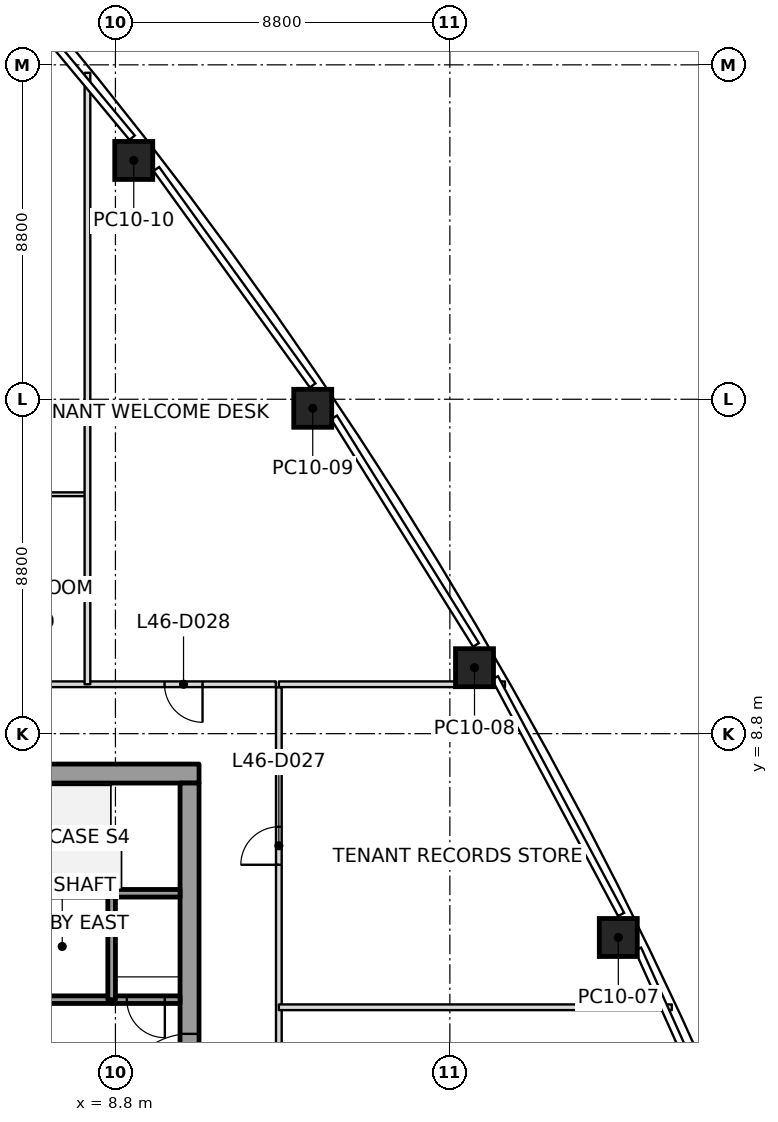
"""IFC4 building model, lengths in metres.
Left out: names, types, materials, properties, quantities, classifications, styles, units other than length and angle.
Written with IfcOpenShell. Run it as: python <this file> out.ifc"""

import sys

from ifc_helpers import new_model, si_unit, direction, frame, frame_2d, origin, origin_2d, place, context, subcontext, project, spatial, rectangle, extrude, element, fill, save


model = new_model("IFC4")
c1 = context("Model", 3, precision=1e-05, world=origin(), true_north=direction((0.0, 1.0)))
c2 = subcontext(c1, "Body", "Model", "MODEL_VIEW")
j1 = project(units=[si_unit("LENGTHUNIT", "METRE"), si_unit("PLANEANGLEUNIT", "RADIAN")], contexts=[c1])
p1 = place(None, origin())
s1 = spatial("IfcSite", under=j1, at=p1, CompositionType="ELEMENT")
p2 = place(p1, origin())
s2 = spatial("IfcBuilding", under=s1, at=p2, CompositionType="ELEMENT")
p3 = place(p2, frame((0.0, 0.0, 205.8)))
s3 = spatial("IfcBuildingStorey", under=s2, at=p3, CompositionType="ELEMENT", Elevation=205.8)
p4 = place(p3, frame((22.032, 3.436, 0.0), z_axis=(-0.014097691364, 0.002013955909, 0.999898594398), x_axis=(-0.440047461755, 0.897938764749, -0.008012874933)))
e1 = element("IfcColumn", 1, at=p4, inside=s3, PredefinedType="COLUMN", context=c2, shape_type="SweptSolid", body=[
    extrude(rectangle(XDim=1.0, YDim=1.0, at=origin_2d()), origin(), (0.0, 0.0, 1.0), 4.0),
])
p5 = place(p3, frame((18.248, 10.536, 0.0), z_axis=(-0.009887052741, -0.005675900648, 0.999935013058), x_axis=(-0.49997556095, 0.866039512773, -2.7732311e-05)))
e2 = element("IfcColumn", 2, at=p5, inside=s3, PredefinedType="COLUMN", context=c2, shape_type="SweptSolid", body=[
    extrude(rectangle(XDim=1.0, YDim=1.0, at=origin_2d()), origin(), (0.0, 0.0, 1.0), 4.0),
])
p6 = place(p3, frame((13.992, 17.362, 0.0), z_axis=(-0.005248490815, -0.013243284963, 0.999898529226), x_axis=(-0.557596902326, 0.830072656678, 0.008067165094)))
e3 = element("IfcColumn", 3, at=p6, inside=s3, PredefinedType="COLUMN", context=c2, shape_type="SweptSolid", body=[
    extrude(rectangle(XDim=1.0, YDim=1.0, at=origin_2d()), origin(), (0.0, 0.0, 1.0), 4.0),
])
p7 = place(p3, frame((9.282, 23.884, 0.0), z_axis=(-0.0002440896, -0.020442503975, 0.999791000385), x_axis=(-0.612639458627, 0.790200388685, 0.016007481224)))
e4 = element("IfcColumn", 4, at=p7, inside=s3, PredefinedType="COLUMN", context=c2, shape_type="SweptSolid", body=[
    extrude(rectangle(XDim=1.0, YDim=1.0, at=origin_2d()), origin(), (0.0, 0.0, 1.0), 4.001),
])
p8 = place(p3, frame((-11.0, 7.75, 0.0), z_axis=(0.0, 0.0, 1.0), x_axis=(1.0, 0.0, 0.0)))
e5 = element("IfcWall", 5, at=p8, inside=s3, PredefinedType="SHEAR", context=c2, shape_type="SweptSolid", body=[
    extrude(rectangle(XDim=22.0, YDim=0.5, at=frame_2d((11.0, 0.0))), origin(), (0.0, 0.0, 1.0), 4.0),
])
p9 = place(p8, frame((10.45, 0.0, 0.0)))
e6 = element("IfcOpeningElement", 6, at=p9, cuts=e5, PredefinedType="OPENING", context=c2, shape_type="SweptSolid", body=[
    extrude(rectangle(XDim=1.1, YDim=2.1, at=frame_2d((0.55, 1.05))), frame((0.0, 0.25, 0.0), z_axis=(0.0, -1.0, 0.0), x_axis=(1.0, 0.0, 0.0)), (0.0, 0.0, 1.0), 0.5),
])
p10 = place(p3, frame((10.75, -7.5, 0.0), z_axis=(0.0, 0.0, 1.0), x_axis=(0.0, 1.0, 0.0)))
e7 = element("IfcWall", 7, at=p10, inside=s3, PredefinedType="SHEAR", context=c2, shape_type="SweptSolid", body=[
    extrude(rectangle(XDim=15.0, YDim=0.5, at=frame_2d((7.5, 0.0))), origin(), (0.0, 0.0, 1.0), 4.0),
])
p11 = place(p10, frame((6.6, 0.0, 0.0)))
e8 = element("IfcOpeningElement", 8, at=p11, cuts=e7, PredefinedType="OPENING", context=c2, shape_type="SweptSolid", body=[
    extrude(rectangle(XDim=1.8, YDim=2.1, at=frame_2d((0.9, 1.05))), frame((0.0, 0.25, 0.0), z_axis=(0.0, -1.0, 0.0), x_axis=(1.0, 0.0, 0.0)), (0.0, 0.0, 1.0), 0.5),
])
for number, where, z_axis, x_axis in (
    (9, (8.7, 1.8, 0.0), (0.0, 0.0, 1.0), (-1.0, 0.0, 0.0)),
    (10, (8.7, 4.6, 0.0), (0.0, 0.0, 1.0), (-1.0, 0.0, 0.0)),
):
    element("IfcWall", number, at=place(p3, frame(where, z_axis=z_axis, x_axis=x_axis)), inside=s3, PredefinedType="SOLIDWALL", context=c2, shape_type="SweptSolid", body=[
        extrude(rectangle(XDim=2.6, YDim=0.2, at=frame_2d((1.3, 0.0))), origin(), (0.0, 0.0, 1.0), 3.85),
    ])
p12 = place(p3, frame((10.5, 1.8, 0.0), z_axis=(0.0, 0.0, 1.0), x_axis=(-1.0, 0.0, 0.0)))
e11 = element("IfcWall", 11, at=p12, inside=s3, PredefinedType="SOLIDWALL", context=c2, shape_type="SweptSolid", body=[
    extrude(rectangle(XDim=1.8, YDim=0.2, at=frame_2d((0.9, 0.0))), origin(), (0.0, 0.0, 1.0), 3.85),
])
p13 = place(p12, frame((0.4, 0.0, 0.0)))
e12 = element("IfcOpeningElement", 12, at=p13, cuts=e11, PredefinedType="OPENING", context=c2, shape_type="SweptSolid", body=[
    extrude(rectangle(XDim=1.0, YDim=2.1, at=frame_2d((0.5, 1.05))), frame((0.0, 0.1, 0.0), z_axis=(0.0, -1.0, 0.0), x_axis=(1.0, 0.0, 0.0)), (0.0, 0.0, 1.0), 0.2),
])
p14 = place(p3, frame((8.7, 4.6, 0.0), z_axis=(0.0, 0.0, 1.0), x_axis=(0.0, -1.0, 0.0)))
e13 = element("IfcWall", 13, at=p14, inside=s3, PredefinedType="SOLIDWALL", context=c2, shape_type="SweptSolid", body=[
    extrude(rectangle(XDim=2.8, YDim=0.2, at=frame_2d((1.4, 0.0))), origin(), (0.0, 0.0, 1.0), 3.85),
])
p15 = place(p3, frame((10.5, 4.6, 0.0), z_axis=(0.0, 0.0, 1.0), x_axis=(-1.0, 0.0, 0.0)))
e14 = element("IfcWall", 14, at=p15, inside=s3, PredefinedType="SOLIDWALL", context=c2, shape_type="SweptSolid", body=[
    extrude(rectangle(XDim=1.8, YDim=0.2, at=frame_2d((0.9, 0.0))), origin(), (0.0, 0.0, 1.0), 3.85),
])
p16 = place(p3, frame((8.064, 10.1, 0.0), z_axis=(0.0, 0.0, 1.0), x_axis=(0.0, 1.0, 0.0)))
e15 = element("IfcWall", 15, at=p16, inside=s3, PredefinedType="PARTITIONING", context=c2, shape_type="SweptSolid", body=[
    extrude(rectangle(XDim=16.09, YDim=0.15, at=frame_2d((8.045, 0.0))), origin(), (0.0, 0.0, 1.0), 3.234),
])
p17 = place(p3, frame((23.44, 1.6, 0.0), z_axis=(0.0, 0.0, 1.0), x_axis=(-1.0, 0.0, 0.0)))
e16 = element("IfcWall", 16, at=p17, inside=s3, PredefinedType="PARTITIONING", context=c2, shape_type="SweptSolid", body=[
    extrude(rectangle(XDim=10.34, YDim=0.15, at=frame_2d((5.17, 0.0))), origin(), (0.0, 0.0, 1.0), 3.234),
])
p18 = place(p3, frame((13.1, 10.1, 0.0), z_axis=(0.0, 0.0, 1.0), x_axis=(1.0, 0.0, 0.0)))
e17 = element("IfcWall", 17, at=p18, inside=s3, PredefinedType="PARTITIONING", context=c2, shape_type="SweptSolid", body=[
    extrude(rectangle(XDim=5.949, YDim=0.15, at=frame_2d((2.975, 0.0))), origin(), (0.0, 0.0, 1.0), 3.234),
])
p19 = place(p3, frame((13.02, 10.1, 0.0), z_axis=(0.0, 0.0, 1.0), x_axis=(-1.0, 0.0, 0.0)))
e18 = element("IfcWall", 18, at=p19, inside=s3, PredefinedType="PARTITIONING", context=c2, shape_type="SweptSolid", body=[
    extrude(rectangle(XDim=24.956, YDim=0.15, at=frame_2d((12.478, 0.0))), origin(), (0.0, 0.0, 1.0), 3.166),
])
p20 = place(p19, frame((1.928, 0.0, 0.0)))
e19 = element("IfcOpeningElement", 19, at=p20, cuts=e18, PredefinedType="OPENING", context=c2, shape_type="SweptSolid", body=[
    extrude(rectangle(XDim=1.0, YDim=2.1, at=frame_2d((0.5, 1.05))), frame((0.0, 0.075, 0.0), z_axis=(0.0, -1.0, 0.0), x_axis=(1.0, 0.0, 0.0)), (0.0, 0.0, 1.0), 0.15),
])
p21 = place(p19, frame((6.606, 0.0, 0.0)))
e20 = element("IfcOpeningElement", 20, at=p21, cuts=e18, PredefinedType="OPENING", context=c2, shape_type="SweptSolid", body=[
    extrude(rectangle(XDim=0.9, YDim=2.1, at=frame_2d((0.45, 1.05))), frame((0.0, 0.075, 0.0), z_axis=(0.0, -1.0, 0.0), x_axis=(1.0, 0.0, 0.0)), (0.0, 0.0, 1.0), 0.15),
])
p22 = place(p19, frame((12.356, 0.0, 0.0)))
e21 = element("IfcOpeningElement", 21, at=p22, cuts=e18, PredefinedType="OPENING", context=c2, shape_type="SweptSolid", body=[
    extrude(rectangle(XDim=1.0, YDim=2.1, at=frame_2d((0.5, 1.05))), frame((0.0, 0.075, 0.0), z_axis=(0.0, -1.0, 0.0), x_axis=(1.0, 0.0, 0.0)), (0.0, 0.0, 1.0), 0.15),
])
p23 = place(p19, frame((18.106, 0.0, 0.0)))
e22 = element("IfcOpeningElement", 22, at=p23, cuts=e18, PredefinedType="OPENING", context=c2, shape_type="SweptSolid", body=[
    extrude(rectangle(XDim=0.9, YDim=2.1, at=frame_2d((0.45, 1.05))), frame((0.0, 0.075, 0.0), z_axis=(0.0, -1.0, 0.0), x_axis=(1.0, 0.0, 0.0)), (0.0, 0.0, 1.0), 0.15),
])
p24 = place(p19, frame((22.356, 0.0, 0.0)))
e23 = element("IfcOpeningElement", 23, at=p24, cuts=e18, PredefinedType="OPENING", context=c2, shape_type="SweptSolid", body=[
    extrude(rectangle(XDim=1.0, YDim=2.1, at=frame_2d((0.5, 1.05))), frame((0.0, 0.075, 0.0), z_axis=(0.0, -1.0, 0.0), x_axis=(1.0, 0.0, 0.0)), (0.0, 0.0, 1.0), 0.15),
])
p25 = place(p3, frame((13.1, -10.02, 0.0), z_axis=(0.0, 0.0, 1.0), x_axis=(0.0, 1.0, 0.0)))
e24 = element("IfcWall", 24, at=p25, inside=s3, PredefinedType="PARTITIONING", context=c2, shape_type="SweptSolid", body=[
    extrude(rectangle(XDim=20.04, YDim=0.15, at=frame_2d((10.02, 0.0))), origin(), (0.0, 0.0, 1.0), 3.166),
])
p26 = place(p25, frame((15.37, 0.0, 0.0)))
e25 = element("IfcOpeningElement", 25, at=p26, cuts=e24, PredefinedType="OPENING", context=c2, shape_type="SweptSolid", body=[
    extrude(rectangle(XDim=1.0, YDim=2.1, at=frame_2d((0.5, 1.05))), frame((0.0, 0.075, 0.0), z_axis=(0.0, -1.0, 0.0), x_axis=(1.0, 0.0, 0.0)), (0.0, 0.0, 1.0), 0.15),
])
p27 = place(p25, frame((1.55, 0.0, 0.0)))
e26 = element("IfcOpeningElement", 26, at=p27, cuts=e24, PredefinedType="OPENING", context=c2, shape_type="SweptSolid", body=[
    extrude(rectangle(XDim=0.9, YDim=2.1, at=frame_2d((0.45, 1.05))), frame((0.0, 0.075, 0.0), z_axis=(0.0, -1.0, 0.0), x_axis=(1.0, 0.0, 0.0)), (0.0, 0.0, 1.0), 0.15),
])
p28 = place(p25, frame((7.41, 0.0, 0.0)))
e27 = element("IfcOpeningElement", 27, at=p28, cuts=e24, PredefinedType="OPENING", context=c2, shape_type="SweptSolid", body=[
    extrude(rectangle(XDim=1.0, YDim=2.1, at=frame_2d((0.5, 1.05))), frame((0.0, 0.075, 0.0), z_axis=(0.0, -1.0, 0.0), x_axis=(1.0, 0.0, 0.0)), (0.0, 0.0, 1.0), 0.15),
])
p29 = place(p3, frame((3.864, 15.1, 0.0), z_axis=(0.0, 0.0, 1.0), x_axis=(1.0, 0.0, 0.0)))
e28 = element("IfcWall", 28, at=p29, inside=s3, PredefinedType="PARTITIONING", context=c2, shape_type="SweptSolid", body=[
    extrude(rectangle(XDim=4.17, YDim=0.1, at=frame_2d((2.085, 0.0))), origin(), (0.0, 0.0, 1.0), 3.45),
])
p30 = place(p26, origin())
e29 = element("IfcDoor", 29, at=p30, inside=s3, OperationType="SINGLE_SWING_LEFT", PredefinedType="DOOR", context=c2, shape_type="SweptSolid", body=[
    extrude(rectangle(XDim=1.0, YDim=2.1, at=frame_2d((0.5, 1.05))), frame((0.0, 0.025, 0.0), z_axis=(0.0, -1.0, 0.0), x_axis=(1.0, 0.0, 0.0)), (0.0, 0.0, 1.0), 0.05),
])
fill(e25, e29)
p31 = place(p20, origin())
e30 = element("IfcDoor", 30, at=p31, inside=s3, OperationType="SINGLE_SWING_LEFT", PredefinedType="DOOR", context=c2, shape_type="SweptSolid", body=[
    extrude(rectangle(XDim=1.0, YDim=2.1, at=frame_2d((0.5, 1.05))), frame((0.0, 0.025, 0.0), z_axis=(0.0, -1.0, 0.0), x_axis=(1.0, 0.0, 0.0)), (0.0, 0.0, 1.0), 0.05),
])
fill(e19, e30)
p32 = place(p13, origin())
e31 = element("IfcDoor", 31, at=p32, inside=s3, OperationType="SINGLE_SWING_RIGHT", PredefinedType="DOOR", context=c2, shape_type="SweptSolid", body=[
    extrude(rectangle(XDim=1.0, YDim=2.1, at=frame_2d((0.5, 1.05))), frame((0.0, 0.025, 0.0), z_axis=(0.0, -1.0, 0.0), x_axis=(1.0, 0.0, 0.0)), (0.0, 0.0, 1.0), 0.05),
])
fill(e12, e31)
p33 = place(p11, origin())
e32 = element("IfcDoor", 32, at=p33, inside=s3, OperationType="DOUBLE_DOOR_SINGLE_SWING", PredefinedType="DOOR", context=c2, shape_type="SweptSolid", body=[
    extrude(rectangle(XDim=1.8, YDim=2.1, at=frame_2d((0.9, 1.05))), frame((0.0, 0.025, 0.0), z_axis=(0.0, -1.0, 0.0), x_axis=(1.0, 0.0, 0.0)), (0.0, 0.0, 1.0), 0.05),
])
fill(e8, e32)
save(model, sys.argv[1])
